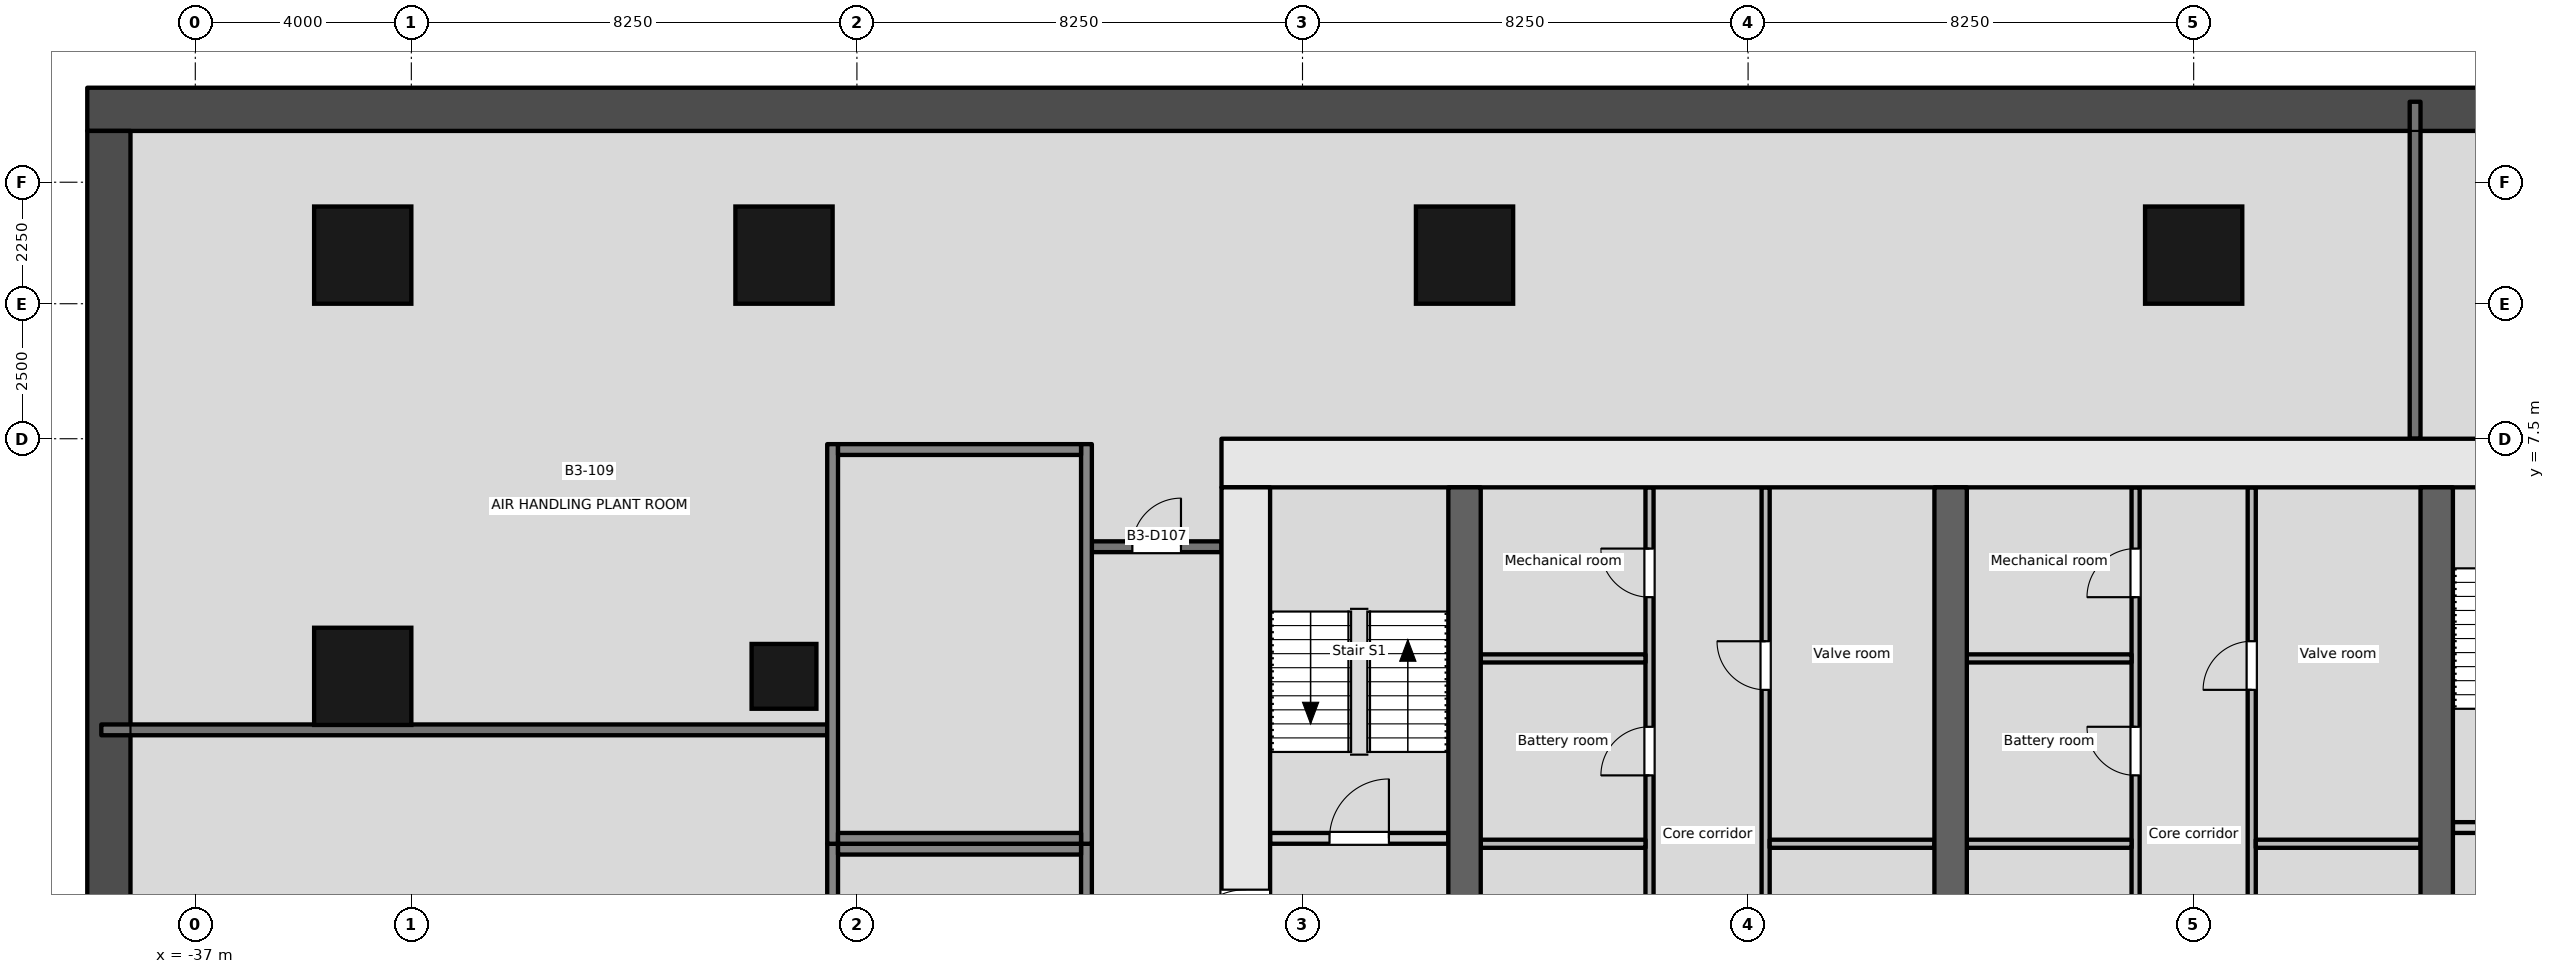
"""IFC4 building model, lengths in metres.
Left out: names, types, materials, properties, quantities, classifications, styles, units other than length and angle.
Written with IfcOpenShell. Run it as: python <this file> out.ifc"""

import sys

from ifc_helpers import new_model, si_unit, direction, frame, frame_2d, origin, origin_2d, place, context, subcontext, project, spatial, rectangle, extrude, element, fill, save


model = new_model("IFC4")
c1 = context("Model", 3, precision=1e-05, world=origin(), true_north=direction((0.0, 1.0)))
c2 = subcontext(c1, "Body", "Model", "MODEL_VIEW")
j1 = project(units=[si_unit("LENGTHUNIT", "METRE"), si_unit("PLANEANGLEUNIT", "RADIAN")], contexts=[c1])
p1 = place(None, origin())
s1 = spatial("IfcSite", under=j1, at=p1, CompositionType="ELEMENT")
p2 = place(p1, origin())
s2 = spatial("IfcBuilding", under=s1, at=p2, CompositionType="ELEMENT")
p3 = place(p2, frame((0.0, 0.0, -13.5)))
s3 = spatial("IfcBuildingStorey", under=s2, at=p3, CompositionType="ELEMENT", Elevation=-13.5)
p4 = place(p3, frame((-39.0, 13.6, -0.25), z_axis=(0.0, 0.0, 1.0), x_axis=(1.0, 0.0, 0.0)))
e1 = element("IfcWall", 1, at=p4, inside=s3, PredefinedType="SOLIDWALL", context=c2, shape_type="SweptSolid", body=[
    extrude(rectangle(XDim=78.0, YDim=0.8, at=frame_2d((39.0, 0.0))), origin(), (0.0, 0.0, 1.0), 4.05),
])
p5 = place(p3, frame((-38.6, -38.7, -0.25), z_axis=(0.0, 0.0, 1.0), x_axis=(0.0, 1.0, 0.0)))
e2 = element("IfcWall", 2, at=p5, inside=s3, PredefinedType="SOLIDWALL", context=c2, shape_type="SweptSolid", body=[
    extrude(rectangle(XDim=51.9, YDim=0.8, at=frame_2d((25.95, 0.0))), origin(), (0.0, 0.0, 1.0), 4.05),
])
for number, where, z_axis, x_axis in (
    (3, (-33.9, 10.9, -0.25), (0.0, 0.0, 1.0), (1.0, 0.0, 0.0)),
    (4, (-33.9, 3.1, -0.25), (0.0, 0.0, 1.0), (0.0, 1.0, 0.0)),
    (5, (-26.1, 10.9, -0.25), (0.0, 0.0, 1.0), (1.0, 0.0, 0.0)),
    (6, (-13.5, 10.9, -0.25), (0.0, 0.0, 1.0), (1.0, 0.0, 0.0)),
    (7, (0.0, 10.9, -0.25), (0.0, 0.0, 1.0), (1.0, 0.0, 0.0)),
):
    element("IfcColumn", number, at=place(p3, frame(where, z_axis=z_axis, x_axis=x_axis)), inside=s3, PredefinedType="COLUMN", context=c2, shape_type="SweptSolid", body=[
        extrude(rectangle(XDim=1.8, YDim=1.8, at=origin_2d()), origin(), (0.0, 0.0, 1.0), 4.05),
    ])
p6 = place(p3, frame((-26.1, 3.1, -0.25), z_axis=(0.0, 0.0, 1.0), x_axis=(1.0, 0.0, 0.0)))
e8 = element("IfcColumn", 8, at=p6, inside=s3, PredefinedType="COLUMN", context=c2, shape_type="SweptSolid", body=[
    extrude(rectangle(XDim=1.2, YDim=1.2, at=origin_2d()), origin(), (0.0, 0.0, 1.0), 4.05),
])
p7 = place(p3, frame((-18.0, 7.05, -0.2), z_axis=(0.0, 0.0, 1.0), x_axis=(1.0, 0.0, 0.0)))
e9 = element("IfcWall", 9, at=p7, inside=s3, PredefinedType="SHEAR", context=c2, shape_type="SweptSolid", body=[
    extrude(rectangle(XDim=36.0, YDim=0.9, at=frame_2d((18.0, 0.0))), origin(), (0.0, 0.0, 1.0), 4.0),
])
p8 = place(p3, frame((-17.55, -6.6, -0.2), z_axis=(0.0, 0.0, 1.0), x_axis=(0.0, 1.0, 0.0)))
e10 = element("IfcWall", 10, at=p8, inside=s3, PredefinedType="SHEAR", context=c2, shape_type="SweptSolid", body=[
    extrude(rectangle(XDim=13.2, YDim=0.9, at=frame_2d((6.6, 0.0))), origin(), (0.0, 0.0, 1.0), 4.0),
])
p9 = place(p8, frame((4.55, 0.0, 0.2)))
e11 = element("IfcOpeningElement", 11, at=p9, cuts=e10, PredefinedType="OPENING", context=c2, shape_type="SweptSolid", body=[
    extrude(rectangle(XDim=1.2, YDim=2.1, at=frame_2d((0.6, 1.05))), frame((0.0, 0.46, 0.0), z_axis=(0.0, -1.0, 0.0), x_axis=(1.0, 0.0, 0.0)), (0.0, 0.0, 1.0), 0.921),
])
for number, where, z_axis, x_axis in (
    (12, (-13.5, -6.6, -0.2), (0.0, 0.0, 1.0), (0.0, 1.0, 0.0)),
    (13, (-4.5, -6.6, -0.2), (0.0, 0.0, 1.0), (0.0, 1.0, 0.0)),
    (14, (4.5, -6.6, -0.2), (0.0, 0.0, 1.0), (0.0, 1.0, 0.0)),
):
    element("IfcWall", number, at=place(p3, frame(where, z_axis=z_axis, x_axis=x_axis)), inside=s3, PredefinedType="SHEAR", context=c2, shape_type="SweptSolid", body=[
        extrude(rectangle(XDim=13.2, YDim=0.6, at=frame_2d((6.6, 0.0))), origin(), (0.0, 0.0, 1.0), 4.0),
    ])
p10 = place(p3, frame((-17.1, 0.1, 0.0), z_axis=(0.0, 0.0, 1.0), x_axis=(1.0, 0.0, 0.0)))
e15 = element("IfcWall", 15, at=p10, inside=s3, PredefinedType="PARTITIONING", context=c2, shape_type="SweptSolid", body=[
    extrude(rectangle(XDim=3.3, YDim=0.2, at=frame_2d((1.65, 0.0))), origin(), (0.0, 0.0, 1.0), 3.8),
])
p11 = place(p10, frame((1.1, 0.0, 0.0)))
e16 = element("IfcOpeningElement", 16, at=p11, cuts=e15, PredefinedType="OPENING", context=c2, shape_type="SweptSolid", body=[
    extrude(rectangle(XDim=1.1, YDim=2.1, at=frame_2d((0.55, 1.05))), frame((0.0, 0.111, 0.0), z_axis=(0.0, -1.0, 0.0), x_axis=(1.0, 0.0, 0.0)), (0.0, 0.0, 1.0), 0.221),
])
p12 = place(p3, frame((-10.075, -6.6, 0.0), z_axis=(0.0, 0.0, 1.0), x_axis=(0.0, 1.0, 0.0)))
e17 = element("IfcWall", 17, at=p12, inside=s3, PredefinedType="PARTITIONING", context=c2, shape_type="SweptSolid", body=[
    extrude(rectangle(XDim=13.2, YDim=0.15, at=frame_2d((6.6, 0.0))), origin(), (0.0, 0.0, 1.0), 3.8),
])
p13 = place(p12, frame((1.266, 0.0, 0.0)))
e18 = element("IfcOpeningElement", 18, at=p13, cuts=e17, PredefinedType="OPENING", context=c2, shape_type="SweptSolid", body=[
    extrude(rectangle(XDim=0.9, YDim=2.1, at=frame_2d((0.45, 1.05))), frame((0.0, 0.085, 0.0), z_axis=(0.0, -1.0, 0.0), x_axis=(1.0, 0.0, 0.0)), (0.0, 0.0, 1.0), 0.171),
])
p14 = place(p12, frame((4.566, 0.0, 0.0)))
e19 = element("IfcOpeningElement", 19, at=p14, cuts=e17, PredefinedType="OPENING", context=c2, shape_type="SweptSolid", body=[
    extrude(rectangle(XDim=0.9, YDim=2.1, at=frame_2d((0.45, 1.05))), frame((0.0, 0.085, 0.0), z_axis=(0.0, -1.0, 0.0), x_axis=(1.0, 0.0, 0.0)), (0.0, 0.0, 1.0), 0.171),
])
p15 = place(p12, frame((7.866, 0.0, 0.0)))
e20 = element("IfcOpeningElement", 20, at=p15, cuts=e17, PredefinedType="OPENING", context=c2, shape_type="SweptSolid", body=[
    extrude(rectangle(XDim=0.9, YDim=2.1, at=frame_2d((0.45, 1.05))), frame((0.0, 0.085, 0.0), z_axis=(0.0, -1.0, 0.0), x_axis=(1.0, 0.0, 0.0)), (0.0, 0.0, 1.0), 0.171),
])
p16 = place(p12, frame((11.166, 0.0, 0.0)))
e21 = element("IfcOpeningElement", 21, at=p16, cuts=e17, PredefinedType="OPENING", context=c2, shape_type="SweptSolid", body=[
    extrude(rectangle(XDim=0.9, YDim=2.1, at=frame_2d((0.45, 1.05))), frame((0.0, 0.085, 0.0), z_axis=(0.0, -1.0, 0.0), x_axis=(1.0, 0.0, 0.0)), (0.0, 0.0, 1.0), 0.171),
])
for number, where, z_axis, x_axis in (
    (22, (-13.2, 0.0, 0.0), (0.0, 0.0, 1.0), (1.0, 0.0, 0.0)),
    (23, (-13.2, 3.432, 0.0), (0.0, 0.0, 1.0), (1.0, 0.0, 0.0)),
):
    element("IfcWall", number, at=place(p3, frame(where, z_axis=z_axis, x_axis=x_axis)), inside=s3, PredefinedType="PARTITIONING", context=c2, shape_type="SweptSolid", body=[
        extrude(rectangle(XDim=3.05, YDim=0.15, at=frame_2d((1.525, 0.0))), origin(), (0.0, 0.0, 1.0), 3.8),
    ])
p17 = place(p3, frame((-7.925, -6.6, 0.0), z_axis=(0.0, 0.0, 1.0), x_axis=(0.0, 1.0, 0.0)))
e24 = element("IfcWall", 24, at=p17, inside=s3, PredefinedType="PARTITIONING", context=c2, shape_type="SweptSolid", body=[
    extrude(rectangle(XDim=13.2, YDim=0.15, at=frame_2d((6.6, 0.0))), origin(), (0.0, 0.0, 1.0), 3.8),
])
p18 = place(p17, frame((2.85, 0.0, 0.0)))
e25 = element("IfcOpeningElement", 25, at=p18, cuts=e24, PredefinedType="OPENING", context=c2, shape_type="SweptSolid", body=[
    extrude(rectangle(XDim=0.9, YDim=2.1, at=frame_2d((0.45, 1.05))), frame((0.0, 0.085, 0.0), z_axis=(0.0, -1.0, 0.0), x_axis=(1.0, 0.0, 0.0)), (0.0, 0.0, 1.0), 0.171),
])
p19 = place(p17, frame((9.45, 0.0, 0.0)))
e26 = element("IfcOpeningElement", 26, at=p19, cuts=e24, PredefinedType="OPENING", context=c2, shape_type="SweptSolid", body=[
    extrude(rectangle(XDim=0.9, YDim=2.1, at=frame_2d((0.45, 1.05))), frame((0.0, 0.085, 0.0), z_axis=(0.0, -1.0, 0.0), x_axis=(1.0, 0.0, 0.0)), (0.0, 0.0, 1.0), 0.171),
])
p20 = place(p3, frame((-7.85, 0.0, 0.0), z_axis=(0.0, 0.0, 1.0), x_axis=(1.0, 0.0, 0.0)))
e27 = element("IfcWall", 27, at=p20, inside=s3, PredefinedType="PARTITIONING", context=c2, shape_type="SweptSolid", body=[
    extrude(rectangle(XDim=3.05, YDim=0.15, at=frame_2d((1.525, 0.0))), origin(), (0.0, 0.0, 1.0), 3.8),
])
p21 = place(p3, frame((-1.075, -6.6, 0.0), z_axis=(0.0, 0.0, 1.0), x_axis=(0.0, 1.0, 0.0)))
e28 = element("IfcWall", 28, at=p21, inside=s3, PredefinedType="PARTITIONING", context=c2, shape_type="SweptSolid", body=[
    extrude(rectangle(XDim=13.2, YDim=0.15, at=frame_2d((6.6, 0.0))), origin(), (0.0, 0.0, 1.0), 3.8),
])
p22 = place(p21, frame((1.266, 0.0, 0.0)))
e29 = element("IfcOpeningElement", 29, at=p22, cuts=e28, PredefinedType="OPENING", context=c2, shape_type="SweptSolid", body=[
    extrude(rectangle(XDim=0.9, YDim=2.1, at=frame_2d((0.45, 1.05))), frame((0.0, 0.085, 0.0), z_axis=(0.0, -1.0, 0.0), x_axis=(1.0, 0.0, 0.0)), (0.0, 0.0, 1.0), 0.171),
])
p23 = place(p21, frame((4.566, 0.0, 0.0)))
e30 = element("IfcOpeningElement", 30, at=p23, cuts=e28, PredefinedType="OPENING", context=c2, shape_type="SweptSolid", body=[
    extrude(rectangle(XDim=0.9, YDim=2.1, at=frame_2d((0.45, 1.05))), frame((0.0, 0.085, 0.0), z_axis=(0.0, -1.0, 0.0), x_axis=(1.0, 0.0, 0.0)), (0.0, 0.0, 1.0), 0.171),
])
p24 = place(p21, frame((7.866, 0.0, 0.0)))
e31 = element("IfcOpeningElement", 31, at=p24, cuts=e28, PredefinedType="OPENING", context=c2, shape_type="SweptSolid", body=[
    extrude(rectangle(XDim=0.9, YDim=2.1, at=frame_2d((0.45, 1.05))), frame((0.0, 0.085, 0.0), z_axis=(0.0, -1.0, 0.0), x_axis=(1.0, 0.0, 0.0)), (0.0, 0.0, 1.0), 0.171),
])
p25 = place(p21, frame((11.166, 0.0, 0.0)))
e32 = element("IfcOpeningElement", 32, at=p25, cuts=e28, PredefinedType="OPENING", context=c2, shape_type="SweptSolid", body=[
    extrude(rectangle(XDim=0.9, YDim=2.1, at=frame_2d((0.45, 1.05))), frame((0.0, 0.085, 0.0), z_axis=(0.0, -1.0, 0.0), x_axis=(1.0, 0.0, 0.0)), (0.0, 0.0, 1.0), 0.171),
])
for number, where, z_axis, x_axis in (
    (33, (-4.2, 0.0, 0.0), (0.0, 0.0, 1.0), (1.0, 0.0, 0.0)),
    (34, (-4.2, 3.432, 0.0), (0.0, 0.0, 1.0), (1.0, 0.0, 0.0)),
):
    element("IfcWall", number, at=place(p3, frame(where, z_axis=z_axis, x_axis=x_axis)), inside=s3, PredefinedType="PARTITIONING", context=c2, shape_type="SweptSolid", body=[
        extrude(rectangle(XDim=3.05, YDim=0.15, at=frame_2d((1.525, 0.0))), origin(), (0.0, 0.0, 1.0), 3.8),
    ])
p26 = place(p3, frame((1.075, -6.6, 0.0), z_axis=(0.0, 0.0, 1.0), x_axis=(0.0, 1.0, 0.0)))
e35 = element("IfcWall", 35, at=p26, inside=s3, PredefinedType="PARTITIONING", context=c2, shape_type="SweptSolid", body=[
    extrude(rectangle(XDim=13.2, YDim=0.15, at=frame_2d((6.6, 0.0))), origin(), (0.0, 0.0, 1.0), 3.8),
])
p27 = place(p26, frame((2.85, 0.0, 0.0)))
e36 = element("IfcOpeningElement", 36, at=p27, cuts=e35, PredefinedType="OPENING", context=c2, shape_type="SweptSolid", body=[
    extrude(rectangle(XDim=0.9, YDim=2.1, at=frame_2d((0.45, 1.05))), frame((0.0, 0.085, 0.0), z_axis=(0.0, -1.0, 0.0), x_axis=(1.0, 0.0, 0.0)), (0.0, 0.0, 1.0), 0.171),
])
p28 = place(p26, frame((9.45, 0.0, 0.0)))
e37 = element("IfcOpeningElement", 37, at=p28, cuts=e35, PredefinedType="OPENING", context=c2, shape_type="SweptSolid", body=[
    extrude(rectangle(XDim=0.9, YDim=2.1, at=frame_2d((0.45, 1.05))), frame((0.0, 0.085, 0.0), z_axis=(0.0, -1.0, 0.0), x_axis=(1.0, 0.0, 0.0)), (0.0, 0.0, 1.0), 0.171),
])
p29 = place(p3, frame((1.15, 0.0, 0.0), z_axis=(0.0, 0.0, 1.0), x_axis=(1.0, 0.0, 0.0)))
e38 = element("IfcWall", 38, at=p29, inside=s3, PredefinedType="PARTITIONING", context=c2, shape_type="SweptSolid", body=[
    extrude(rectangle(XDim=3.05, YDim=0.15, at=frame_2d((1.525, 0.0))), origin(), (0.0, 0.0, 1.0), 3.8),
])
p30 = place(p3, frame((4.8, 0.3, 0.0), z_axis=(0.0, 0.0, 1.0), x_axis=(1.0, 0.0, 0.0)))
e39 = element("IfcWall", 39, at=p30, inside=s3, PredefinedType="PARTITIONING", context=c2, shape_type="SweptSolid", body=[
    extrude(rectangle(XDim=3.15, YDim=0.2, at=frame_2d((1.575, 0.0))), origin(), (0.0, 0.0, 1.0), 3.8),
])
for number, where, z_axis, x_axis in (
    (40, (-20.5, 0.0, -0.25), (0.0, 0.0, 1.0), (0.0, -1.0, 0.0)),
    (41, (-25.2, -7.4, -0.25), (0.0, 0.0, 1.0), (0.0, 1.0, 0.0)),
):
    element("IfcWall", number, at=place(p3, frame(where, z_axis=z_axis, x_axis=x_axis)), inside=s3, PredefinedType="SHEAR", context=c2, shape_type="SweptSolid", body=[
        extrude(rectangle(XDim=7.4, YDim=0.2, at=frame_2d((3.7, 0.0))), origin(), (0.0, 0.0, 1.0), 4.05),
    ])
p31 = place(p3, frame((-25.1, -0.1, -0.25), z_axis=(0.0, 0.0, 1.0), x_axis=(1.0, 0.0, 0.0)))
e42 = element("IfcWall", 42, at=p31, inside=s3, PredefinedType="SHEAR", context=c2, shape_type="SweptSolid", body=[
    extrude(rectangle(XDim=4.5, YDim=0.2, at=frame_2d((2.25, 0.0))), origin(), (0.0, 0.0, 1.0), 4.05),
])
for number, where, z_axis, x_axis in (
    (43, (-20.5, 7.4, -0.25), (0.0, 0.0, 1.0), (0.0, -1.0, 0.0)),
    (44, (-25.2, 0.0, -0.25), (0.0, 0.0, 1.0), (0.0, 1.0, 0.0)),
):
    element("IfcWall", number, at=place(p3, frame(where, z_axis=z_axis, x_axis=x_axis)), inside=s3, PredefinedType="SHEAR", context=c2, shape_type="SweptSolid", body=[
        extrude(rectangle(XDim=7.4, YDim=0.2, at=frame_2d((3.7, 0.0))), origin(), (0.0, 0.0, 1.0), 4.05),
    ])
for number, where, z_axis, x_axis in (
    (45, (-25.1, 7.3, -0.25), (0.0, 0.0, 1.0), (1.0, 0.0, 0.0)),
    (46, (-25.1, 0.1, -0.25), (0.0, 0.0, 1.0), (1.0, 0.0, 0.0)),
):
    element("IfcWall", number, at=place(p3, frame(where, z_axis=z_axis, x_axis=x_axis)), inside=s3, PredefinedType="SHEAR", context=c2, shape_type="SweptSolid", body=[
        extrude(rectangle(XDim=4.5, YDim=0.2, at=frame_2d((2.25, 0.0))), origin(), (0.0, 0.0, 1.0), 4.05),
    ])
p32 = place(p3, frame((-20.4, 5.5, 0.0), z_axis=(0.0, 0.0, 1.0), x_axis=(1.0, 0.0, 0.0)))
e47 = element("IfcWall", 47, at=p32, inside=s3, PredefinedType="PARTITIONING", context=c2, shape_type="SweptSolid", body=[
    extrude(rectangle(XDim=2.4, YDim=0.2, at=frame_2d((1.2, 0.0))), origin(), (0.0, 0.0, 1.0), 3.8),
])
p33 = place(p32, frame((0.75, 0.0, 0.0)))
e48 = element("IfcOpeningElement", 48, at=p33, cuts=e47, PredefinedType="OPENING", context=c2, shape_type="SweptSolid", body=[
    extrude(rectangle(XDim=0.9, YDim=2.1, at=frame_2d((0.45, 1.05))), frame((0.0, 0.111, 0.0), z_axis=(0.0, -1.0, 0.0), x_axis=(1.0, 0.0, 0.0)), (0.0, 0.0, 1.0), 0.221),
])
p34 = place(p3, frame((-38.74, 2.109, 0.0), z_axis=(0.0, 0.0, 1.0), x_axis=(1.0, 0.0, 0.0)))
e49 = element("IfcWall", 49, at=p34, inside=s3, PredefinedType="PARTITIONING", context=c2, shape_type="SweptSolid", body=[
    extrude(rectangle(XDim=13.44, YDim=0.2, at=frame_2d((6.72, 0.0))), origin(), (0.0, 0.0, 1.0), 2.6),
])
p35 = place(p3, frame((4.1, 13.74, 0.0), z_axis=(0.0, 0.0, 1.0), x_axis=(0.0, -1.0, 0.0)))
e50 = element("IfcWall", 50, at=p35, inside=s3, PredefinedType="PARTITIONING", context=c2, shape_type="SweptSolid", body=[
    extrude(rectangle(XDim=6.24, YDim=0.2, at=frame_2d((3.12, 0.0))), origin(), (0.0, 0.0, 1.0), 2.8),
])
p36 = place(p9, origin())
e51 = element("IfcDoor", 51, at=p36, inside=s3, OperationType="SINGLE_SWING_LEFT", PredefinedType="DOOR", context=c2, shape_type="SweptSolid", body=[
    extrude(rectangle(XDim=1.2, YDim=2.1, at=frame_2d((0.6, 1.05))), frame((0.0, 0.025, 0.0), z_axis=(0.0, -1.0, 0.0), x_axis=(1.0, 0.0, 0.0)), (0.0, 0.0, 1.0), 0.05),
])
fill(e11, e51)
p37 = place(p11, origin())
e52 = element("IfcDoor", 52, at=p37, inside=s3, OperationType="SINGLE_SWING_RIGHT", PredefinedType="DOOR", context=c2, shape_type="SweptSolid", body=[
    extrude(rectangle(XDim=1.1, YDim=2.1, at=frame_2d((0.55, 1.05))), frame((0.0, 0.025, 0.0), z_axis=(0.0, -1.0, 0.0), x_axis=(1.0, 0.0, 0.0)), (0.0, 0.0, 1.0), 0.05),
])
fill(e16, e52)
p38 = place(p15, origin())
e53 = element("IfcDoor", 53, at=p38, inside=s3, OperationType="SINGLE_SWING_LEFT", PredefinedType="DOOR", context=c2, shape_type="SweptSolid", body=[
    extrude(rectangle(XDim=0.9, YDim=2.1, at=frame_2d((0.45, 1.05))), frame((0.0, 0.025, 0.0), z_axis=(0.0, -1.0, 0.0), x_axis=(1.0, 0.0, 0.0)), (0.0, 0.0, 1.0), 0.05),
])
fill(e20, e53)
p39 = place(p16, origin())
e54 = element("IfcDoor", 54, at=p39, inside=s3, OperationType="SINGLE_SWING_RIGHT", PredefinedType="DOOR", context=c2, shape_type="SweptSolid", body=[
    extrude(rectangle(XDim=0.9, YDim=2.1, at=frame_2d((0.45, 1.05))), frame((0.0, 0.025, 0.0), z_axis=(0.0, -1.0, 0.0), x_axis=(1.0, 0.0, 0.0)), (0.0, 0.0, 1.0), 0.05),
])
fill(e21, e54)
p40 = place(p19, origin())
e55 = element("IfcDoor", 55, at=p40, inside=s3, OperationType="SINGLE_SWING_RIGHT", PredefinedType="DOOR", context=c2, shape_type="SweptSolid", body=[
    extrude(rectangle(XDim=0.9, YDim=2.1, at=frame_2d((0.45, 1.05))), frame((0.0, 0.025, 0.0), z_axis=(0.0, -1.0, 0.0), x_axis=(1.0, 0.0, 0.0)), (0.0, 0.0, 1.0), 0.05),
])
fill(e26, e55)
p41 = place(p24, origin())
e56 = element("IfcDoor", 56, at=p41, inside=s3, OperationType="SINGLE_SWING_RIGHT", PredefinedType="DOOR", context=c2, shape_type="SweptSolid", body=[
    extrude(rectangle(XDim=0.9, YDim=2.1, at=frame_2d((0.45, 1.05))), frame((0.0, 0.025, 0.0), z_axis=(0.0, -1.0, 0.0), x_axis=(1.0, 0.0, 0.0)), (0.0, 0.0, 1.0), 0.05),
])
fill(e31, e56)
p42 = place(p25, origin())
e57 = element("IfcDoor", 57, at=p42, inside=s3, OperationType="SINGLE_SWING_LEFT", PredefinedType="DOOR", context=c2, shape_type="SweptSolid", body=[
    extrude(rectangle(XDim=0.9, YDim=2.1, at=frame_2d((0.45, 1.05))), frame((0.0, 0.025, 0.0), z_axis=(0.0, -1.0, 0.0), x_axis=(1.0, 0.0, 0.0)), (0.0, 0.0, 1.0), 0.05),
])
fill(e32, e57)
p43 = place(p28, origin())
e58 = element("IfcDoor", 58, at=p43, inside=s3, OperationType="SINGLE_SWING_LEFT", PredefinedType="DOOR", context=c2, shape_type="SweptSolid", body=[
    extrude(rectangle(XDim=0.9, YDim=2.1, at=frame_2d((0.45, 1.05))), frame((0.0, 0.025, 0.0), z_axis=(0.0, -1.0, 0.0), x_axis=(1.0, 0.0, 0.0)), (0.0, 0.0, 1.0), 0.05),
])
fill(e37, e58)
p44 = place(p33, origin())
e59 = element("IfcDoor", 59, at=p44, inside=s3, OperationType="SINGLE_SWING_RIGHT", PredefinedType="DOOR", context=c2, shape_type="SweptSolid", body=[
    extrude(rectangle(XDim=0.9, YDim=2.1, at=frame_2d((0.45, 1.05))), frame((0.0, 0.025, 0.0), z_axis=(0.0, -1.0, 0.0), x_axis=(1.0, 0.0, 0.0)), (0.0, 0.0, 1.0), 0.05),
])
fill(e48, e59)
save(model, sys.argv[1])
